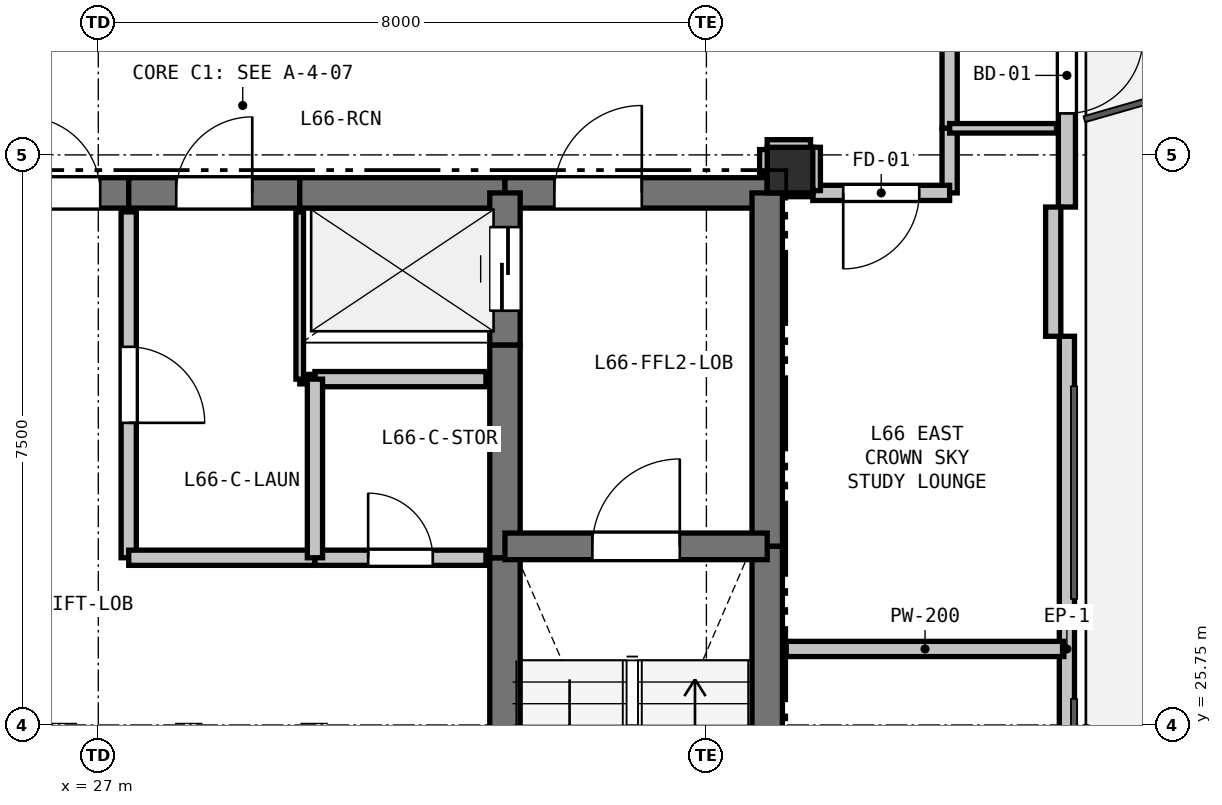
"""IFC4 building model, lengths in metres.
Left out: names, types, materials, properties, quantities, classifications, styles, units other than length and angle.
Written with IfcOpenShell. Run it as: python <this file> out.ifc"""

import sys

from ifc_helpers import new_model, si_unit, direction, frame, frame_2d, origin, origin_2d, place, context, subcontext, project, spatial, rectangle, extrude, element, fill, save


model = new_model("IFC4")
c1 = context("Model", 3, precision=1e-05, world=origin(), true_north=direction((0.0, 1.0)))
c2 = subcontext(c1, "Body", "Model", "MODEL_VIEW")
j1 = project(units=[si_unit("LENGTHUNIT", "METRE"), si_unit("PLANEANGLEUNIT", "RADIAN")], contexts=[c1])
p1 = place(None, origin())
s1 = spatial("IfcSite", under=j1, at=p1, CompositionType="ELEMENT")
p2 = place(p1, origin())
s2 = spatial("IfcBuilding", under=s1, at=p2, CompositionType="ELEMENT")
p3 = place(p2, frame((0.0, 0.0, 236.4)))
s3 = spatial("IfcBuildingStorey", under=s2, at=p3, CompositionType="ELEMENT", Elevation=236.4)
p4 = place(p3, frame((36.1, 33.05, 0.0), z_axis=(0.0, 0.0, 1.0), x_axis=(1.0, 0.0, 0.0)))
e1 = element("IfcColumn", 1, at=p4, inside=s3, PredefinedType="COLUMN", context=c2, shape_type="SweptSolid", body=[
    extrude(rectangle(XDim=0.6, YDim=0.6, at=origin_2d()), origin(), (0.0, 0.0, 1.0), 3.3),
])
p5 = place(p3, frame((20.066, 33.997, 0.0), z_axis=(0.0, 0.0, 1.0), x_axis=(0.866019557082, 0.500010126649, 0.0)))
e2 = element("IfcWall", 2, at=p5, inside=s3, PredefinedType="PARAPET", context=c2, shape_type="SweptSolid", body=[
    extrude(rectangle(XDim=8.228, YDim=0.2, at=frame_2d((4.114, 0.0))), origin(), (0.0, 0.0, 1.0), 0.2),
])
p6 = place(p3, frame((39.743, 41.492, 0.0), z_axis=(0.0, 0.0, 1.0), x_axis=(0.0, -1.0, 0.0)))
e3 = element("IfcWall", 3, at=p6, inside=s3, PredefinedType="SOLIDWALL", context=c2, shape_type="SweptSolid", body=[
    extrude(rectangle(XDim=8.928, YDim=0.225, at=frame_2d((4.464, 0.0))), origin(), (0.0, 0.0, 1.0), 2.7),
])
p7 = place(p6, frame((6.696, 0.0, 0.0)))
e4 = element("IfcOpeningElement", 4, at=p7, cuts=e3, PredefinedType="OPENING", context=c2, shape_type="SweptSolid", body=[
    extrude(rectangle(XDim=1.0, YDim=2.1, at=frame_2d((0.5, 1.05))), frame((0.0, 0.123, 0.0), z_axis=(0.0, -1.0, 0.0), x_axis=(1.0, 0.0, 0.0)), (0.0, 0.0, 1.0), 0.245),
])
p8 = place(p3, frame((39.743, 30.864, 0.0), z_axis=(0.0, 0.0, 1.0), x_axis=(0.0, -1.0, 0.0)))
e5 = element("IfcWall", 5, at=p8, inside=s3, PredefinedType="PARAPET", context=c2, shape_type="SweptSolid", body=[
    extrude(rectangle(XDim=8.228, YDim=0.2, at=frame_2d((4.114, 0.0))), origin(), (0.0, 0.0, 1.0), 0.2),
])
p9 = place(p3, frame((39.563, 32.564, 0.0), z_axis=(0.0, 0.0, 1.0), x_axis=(0.0, -1.0, 0.0)))
e6 = element("IfcWall", 6, at=p9, inside=s3, PredefinedType="PARAPET", context=c2, shape_type="SweptSolid", body=[
    extrude(rectangle(XDim=1.7, YDim=0.2, at=frame_2d((0.85, 0.0))), origin(), (0.0, 0.0, 1.0), 2.7),
])
p10 = place(p3, frame((25.65, 32.75, 0.0), z_axis=(0.0, 0.0, 1.0), x_axis=(1.0, 0.0, 0.0)))
e7 = element("IfcWall", 7, at=p10, inside=s3, PredefinedType="SHEAR", context=c2, shape_type="SweptSolid", body=[
    extrude(rectangle(XDim=1.75, YDim=0.4, at=frame_2d((0.875, 0.0))), origin(), (0.0, 0.0, 1.0), 3.08),
])
p11 = place(p10, frame((0.375, 0.0, 0.0)))
e8 = element("IfcOpeningElement", 8, at=p11, cuts=e7, PredefinedType="OPENING", context=c2, shape_type="SweptSolid", body=[
    extrude(rectangle(XDim=1.0, YDim=2.15, at=frame_2d((0.5, 1.075))), frame((0.0, 0.21, 0.0), z_axis=(0.0, -1.0, 0.0), x_axis=(1.0, 0.0, 0.0)), (0.0, 0.0, 1.0), 0.42),
])
p12 = place(p3, frame((27.4, 32.75, 0.0), z_axis=(0.0, 0.0, 1.0), x_axis=(1.0, 0.0, 0.0)))
e9 = element("IfcWall", 9, at=p12, inside=s3, PredefinedType="SHEAR", context=c2, shape_type="SweptSolid", body=[
    extrude(rectangle(XDim=2.25, YDim=0.4, at=frame_2d((1.125, 0.0))), origin(), (0.0, 0.0, 1.0), 3.08),
])
p13 = place(p12, frame((0.625, 0.0, 0.0)))
e10 = element("IfcOpeningElement", 10, at=p13, cuts=e9, PredefinedType="OPENING", context=c2, shape_type="SweptSolid", body=[
    extrude(rectangle(XDim=1.0, YDim=2.15, at=frame_2d((0.5, 1.075))), frame((0.0, 0.21, 0.0), z_axis=(0.0, -1.0, 0.0), x_axis=(1.0, 0.0, 0.0)), (0.0, 0.0, 1.0), 0.42),
])
p14 = place(p3, frame((29.65, 32.75, 0.0), z_axis=(0.0, 0.0, 1.0), x_axis=(1.0, 0.0, 0.0)))
e11 = element("IfcWall", 11, at=p14, inside=s3, PredefinedType="SHEAR", context=c2, shape_type="SweptSolid", body=[
    extrude(rectangle(XDim=2.7, YDim=0.4, at=frame_2d((1.35, 0.0))), origin(), (0.0, 0.0, 1.0), 3.08),
])
p15 = place(p3, frame((32.35, 32.75, 0.0), z_axis=(0.0, 0.0, 1.0), x_axis=(1.0, 0.0, 0.0)))
e12 = element("IfcWall", 12, at=p15, inside=s3, PredefinedType="SHEAR", context=c2, shape_type="SweptSolid", body=[
    extrude(rectangle(XDim=3.45, YDim=0.4, at=frame_2d((1.725, 0.0))), origin(), (0.0, 0.0, 1.0), 3.08),
])
p16 = place(p15, frame((0.65, 0.0, 0.0)))
e13 = element("IfcOpeningElement", 13, at=p16, cuts=e12, PredefinedType="OPENING", context=c2, shape_type="SweptSolid", body=[
    extrude(rectangle(XDim=1.15, YDim=2.15, at=frame_2d((0.575, 1.075))), frame((0.0, 0.21, 0.0), z_axis=(0.0, -1.0, 0.0), x_axis=(1.0, 0.0, 0.0)), (0.0, 0.0, 1.0), 0.42),
])
p17 = place(p3, frame((35.8, 32.75, 0.0), z_axis=(0.0, 0.0, 1.0), x_axis=(0.0, -1.0, 0.0)))
e14 = element("IfcWall", 14, at=p17, inside=s3, PredefinedType="SHEAR", context=c2, shape_type="SweptSolid", body=[
    extrude(rectangle(XDim=4.65, YDim=0.4, at=frame_2d((2.325, 0.0))), origin(), (0.0, 0.0, 1.0), 3.08),
])
p18 = place(p3, frame((35.8, 28.1, 0.0), z_axis=(0.0, 0.0, 1.0), x_axis=(0.0, -1.0, 0.0)))
e15 = element("IfcWall", 15, at=p18, inside=s3, PredefinedType="SHEAR", context=c2, shape_type="SweptSolid", body=[
    extrude(rectangle(XDim=7.35, YDim=0.4, at=frame_2d((3.675, 0.0))), origin(), (0.0, 0.0, 1.0), 3.08),
])
p19 = place(p3, frame((32.35, 25.55, 0.0), z_axis=(0.0, 0.0, 1.0), x_axis=(0.0, 1.0, 0.0)))
e16 = element("IfcWall", 16, at=p19, inside=s3, PredefinedType="SHEAR", context=c2, shape_type="SweptSolid", body=[
    extrude(rectangle(XDim=2.4, YDim=0.4, at=frame_2d((1.2, 0.0))), origin(), (0.0, 0.0, 1.0), 3.08),
])
p20 = place(p3, frame((32.35, 27.95, 0.0), z_axis=(0.0, 0.0, 1.0), x_axis=(0.0, 1.0, 0.0)))
e17 = element("IfcWall", 17, at=p20, inside=s3, PredefinedType="SHEAR", context=c2, shape_type="SweptSolid", body=[
    extrude(rectangle(XDim=2.8, YDim=0.4, at=frame_2d((1.4, 0.0))), origin(), (0.0, 0.0, 1.0), 3.08),
])
p21 = place(p3, frame((32.35, 30.75, 0.0), z_axis=(0.0, 0.0, 1.0), x_axis=(0.0, 1.0, 0.0)))
e18 = element("IfcWall", 18, at=p21, inside=s3, PredefinedType="SHEAR", context=c2, shape_type="SweptSolid", body=[
    extrude(rectangle(XDim=2.0, YDim=0.4, at=frame_2d((1.0, 0.0))), origin(), (0.0, 0.0, 1.0), 3.08),
])
p22 = place(p21, frame((0.45, 0.0, 0.0)))
e19 = element("IfcOpeningElement", 19, at=p22, cuts=e18, PredefinedType="OPENING", context=c2, shape_type="SweptSolid", body=[
    extrude(rectangle(XDim=1.1, YDim=2.15, at=frame_2d((0.55, 1.075))), frame((0.0, 0.21, 0.0), z_axis=(0.0, -1.0, 0.0), x_axis=(1.0, 0.0, 0.0)), (0.0, 0.0, 1.0), 0.42),
])
p23 = place(p3, frame((32.35, 28.1, 0.0), z_axis=(0.0, 0.0, 1.0), x_axis=(1.0, 0.0, 0.0)))
e20 = element("IfcWall", 20, at=p23, inside=s3, PredefinedType="SHEAR", context=c2, shape_type="SweptSolid", body=[
    extrude(rectangle(XDim=3.45, YDim=0.35, at=frame_2d((1.725, 0.0))), origin(), (0.0, 0.0, 1.0), 3.08),
])
p24 = place(p23, frame((1.15, 0.0, 0.0)))
e21 = element("IfcOpeningElement", 21, at=p24, cuts=e20, PredefinedType="OPENING", context=c2, shape_type="SweptSolid", body=[
    extrude(rectangle(XDim=1.15, YDim=2.15, at=frame_2d((0.575, 1.075))), frame((0.0, 0.185, 0.0), z_axis=(0.0, -1.0, 0.0), x_axis=(1.0, 0.0, 0.0)), (0.0, 0.0, 1.0), 0.37),
])
p25 = place(p3, frame((32.1, 30.3, 0.0), z_axis=(0.0, 0.0, 1.0), x_axis=(-1.0, 0.0, 0.0)))
e22 = element("IfcWall", 22, at=p25, inside=s3, PredefinedType="PARTITIONING", context=c2, shape_type="SweptSolid", body=[
    extrude(rectangle(XDim=2.25, YDim=0.2, at=frame_2d((1.125, 0.0))), origin(), (0.0, 0.0, 1.0), 3.08),
])
p26 = place(p3, frame((29.85, 30.3, 0.0), z_axis=(0.0, 0.0, 1.0), x_axis=(-1.0, 0.0, 0.0)))
e23 = element("IfcWall", 23, at=p26, inside=s3, PredefinedType="PARTITIONING", context=c2, shape_type="SweptSolid", body=[
    extrude(rectangle(XDim=0.2, YDim=0.125, at=frame_2d((0.1, 0.0))), origin(), (0.0, 0.0, 1.0), 3.08),
])
p27 = place(p3, frame((29.65, 30.3, 0.0), z_axis=(0.0, 0.0, 1.0), x_axis=(0.0, 1.0, 0.0)))
e24 = element("IfcWall", 24, at=p27, inside=s3, PredefinedType="PARTITIONING", context=c2, shape_type="SweptSolid", body=[
    extrude(rectangle(XDim=2.2, YDim=0.1, at=frame_2d((1.1, 0.0))), origin(), (0.0, 0.0, 1.0), 3.08),
])
p28 = place(p3, frame((27.4, 32.5, 0.0), z_axis=(0.0, 0.0, 1.0), x_axis=(0.0, -1.0, 0.0)))
e25 = element("IfcWall", 25, at=p28, inside=s3, PredefinedType="PARTITIONING", context=c2, shape_type="SweptSolid", body=[
    extrude(rectangle(XDim=4.55, YDim=0.2, at=frame_2d((2.275, 0.0))), origin(), (0.0, 0.0, 1.0), 3.08),
])
p29 = place(p28, frame((1.775, 0.0, 0.0)))
e26 = element("IfcOpeningElement", 26, at=p29, cuts=e25, PredefinedType="OPENING", context=c2, shape_type="SweptSolid", body=[
    extrude(rectangle(XDim=1.0, YDim=2.15, at=frame_2d((0.5, 1.075))), frame((0.0, 0.11, 0.0), z_axis=(0.0, -1.0, 0.0), x_axis=(1.0, 0.0, 0.0)), (0.0, 0.0, 1.0), 0.22),
])
p30 = place(p3, frame((27.4, 27.95, 0.0), z_axis=(0.0, 0.0, 1.0), x_axis=(1.0, 0.0, 0.0)))
e27 = element("IfcWall", 27, at=p30, inside=s3, PredefinedType="PARTITIONING", context=c2, shape_type="SweptSolid", body=[
    extrude(rectangle(XDim=2.45, YDim=0.2, at=frame_2d((1.225, 0.0))), origin(), (0.0, 0.0, 1.0), 3.08),
])
p31 = place(p3, frame((29.85, 27.95, 0.0), z_axis=(0.0, 0.0, 1.0), x_axis=(1.0, 0.0, 0.0)))
e28 = element("IfcWall", 28, at=p31, inside=s3, PredefinedType="PARTITIONING", context=c2, shape_type="SweptSolid", body=[
    extrude(rectangle(XDim=2.25, YDim=0.2, at=frame_2d((1.125, 0.0))), origin(), (0.0, 0.0, 1.0), 3.08),
])
p32 = place(p31, frame((0.7, 0.0, 0.0)))
e29 = element("IfcOpeningElement", 29, at=p32, cuts=e28, PredefinedType="OPENING", context=c2, shape_type="SweptSolid", body=[
    extrude(rectangle(XDim=0.85, YDim=2.1, at=frame_2d((0.425, 1.05))), frame((0.0, 0.11, 0.0), z_axis=(0.0, -1.0, 0.0), x_axis=(1.0, 0.0, 0.0)), (0.0, 0.0, 1.0), 0.22),
])
p33 = place(p3, frame((38.2, 35.2, 0.0), z_axis=(0.0, 0.0, 1.0), x_axis=(0.0, -1.0, 0.0)))
e30 = element("IfcWall", 30, at=p33, inside=s3, PredefinedType="PARTITIONING", context=c2, shape_type="SweptSolid", body=[
    extrude(rectangle(XDim=1.6, YDim=0.2, at=frame_2d((0.8, 0.0))), origin(), (0.0, 0.0, 1.0), 3.08),
])
p34 = place(p3, frame((38.2, 33.6, 0.0), z_axis=(0.0, 0.0, 1.0), x_axis=(0.0, -1.0, 0.0)))
e31 = element("IfcWall", 31, at=p34, inside=s3, PredefinedType="PARTITIONING", context=c2, shape_type="SweptSolid", body=[
    extrude(rectangle(XDim=0.85, YDim=0.2, at=frame_2d((0.425, 0.0))), origin(), (0.0, 0.0, 1.0), 3.08),
])
p35 = place(p3, frame((38.2, 32.75, 0.0), z_axis=(0.0, 0.0, 1.0), x_axis=(-1.0, 0.0, 0.0)))
e32 = element("IfcWall", 32, at=p35, inside=s3, PredefinedType="PARTITIONING", context=c2, shape_type="SweptSolid", body=[
    extrude(rectangle(XDim=1.8, YDim=0.2, at=frame_2d((0.9, 0.0))), origin(), (0.0, 0.0, 1.0), 3.08),
])
p36 = place(p35, frame((0.4, 0.0, 0.0)))
e33 = element("IfcOpeningElement", 33, at=p36, cuts=e32, PredefinedType="OPENING", context=c2, shape_type="SweptSolid", body=[
    extrude(rectangle(XDim=1.0, YDim=2.15, at=frame_2d((0.5, 1.075))), frame((0.0, 0.11, 0.0), z_axis=(0.0, -1.0, 0.0), x_axis=(1.0, 0.0, 0.0)), (0.0, 0.0, 1.0), 0.22),
])
for number, where, z_axis, x_axis in (
    (34, (36.4, 32.78, 0.0), (0.0, 0.0, 1.0), (0.0, 1.0, 0.0)),
    (35, (36.37, 33.35, 0.0), (0.0, 0.0, 1.0), (-1.0, 0.0, 0.0)),
):
    element("IfcWall", number, at=place(p3, frame(where, z_axis=z_axis, x_axis=x_axis)), inside=s3, PredefinedType="PARTITIONING", context=c2, shape_type="SweptSolid", body=[
        extrude(rectangle(XDim=0.57, YDim=0.2, at=frame_2d((0.285, 0.0))), origin(), (0.0, 0.0, 1.0), 2.528),
    ])
p37 = place(p3, frame((35.8, 33.32, 0.0), z_axis=(0.0, 0.0, 1.0), x_axis=(0.0, -1.0, 0.0)))
e36 = element("IfcWall", 36, at=p37, inside=s3, PredefinedType="PARTITIONING", context=c2, shape_type="SweptSolid", body=[
    extrude(rectangle(XDim=0.32, YDim=0.2, at=frame_2d((0.16, 0.0))), origin(), (0.0, 0.0, 1.0), 2.605),
])
p38 = place(p3, frame((29.85, 30.3, 0.0), z_axis=(0.0, 0.0, 1.0), x_axis=(0.0, -1.0, 0.0)))
e37 = element("IfcWall", 37, at=p38, inside=s3, PredefinedType="PARTITIONING", context=c2, shape_type="SweptSolid", body=[
    extrude(rectangle(XDim=2.35, YDim=0.2, at=frame_2d((1.175, 0.0))), origin(), (0.0, 0.0, 1.0), 3.08),
])
p39 = place(p3, frame((36.05, 32.75, 0.0), z_axis=(0.0, 0.0, 1.0), x_axis=(1.0, 0.0, 0.0)))
e38 = element("IfcWall", 38, at=p39, inside=s3, PredefinedType="PARTITIONING", context=c2, shape_type="SweptSolid", body=[
    extrude(rectangle(XDim=0.35, YDim=0.1, at=frame_2d((0.175, 0.0))), origin(), (0.0, 0.0, 1.0), 2.605),
])
p40 = place(p3, frame((38.2, 33.6, 0.0), z_axis=(0.0, 0.0, 1.0), x_axis=(1.0, 0.0, 0.0)))
e39 = element("IfcWall", 39, at=p40, inside=s3, PredefinedType="PARTITIONING", context=c2, shape_type="SweptSolid", body=[
    extrude(rectangle(XDim=1.406, YDim=0.125, at=frame_2d((0.703, 0.0))), origin(), (0.0, 0.0, 1.0), 2.365),
])
p41 = place(p3, frame((39.703, 26.75, 0.0), z_axis=(0.0, 0.0, 1.0), x_axis=(-1.0, 0.0, 0.0)))
e40 = element("IfcWall", 40, at=p41, inside=s3, PredefinedType="PARTITIONING", context=c2, shape_type="SweptSolid", body=[
    extrude(rectangle(XDim=3.653, YDim=0.2, at=frame_2d((1.826, 0.0))), origin(), (0.0, 0.0, 1.0), 2.365),
])
p42 = place(p7, origin())
e41 = element("IfcDoor", 41, at=p42, inside=s3, OperationType="SINGLE_SWING_LEFT", PredefinedType="DOOR", context=c2, shape_type="SweptSolid", body=[
    extrude(rectangle(XDim=1.0, YDim=2.1, at=frame_2d((0.5, 1.05))), frame((0.0, 0.025, 0.0), z_axis=(0.0, -1.0, 0.0), x_axis=(1.0, 0.0, 0.0)), (0.0, 0.0, 1.0), 0.05),
])
fill(e4, e41)
p43 = place(p11, origin())
e42 = element("IfcDoor", 42, at=p43, inside=s3, OperationType="SINGLE_SWING_LEFT", PredefinedType="DOOR", context=c2, shape_type="SweptSolid", body=[
    extrude(rectangle(XDim=1.0, YDim=2.15, at=frame_2d((0.5, 1.075))), frame((0.0, 0.025, 0.0), z_axis=(0.0, -1.0, 0.0), x_axis=(1.0, 0.0, 0.0)), (0.0, 0.0, 1.0), 0.05),
])
fill(e8, e42)
p44 = place(p22, origin())
e43 = element("IfcDoor", 43, at=p44, inside=s3, OperationType="SLIDING_TO_LEFT", PredefinedType="DOOR", context=c2, shape_type="SweptSolid", body=[
    extrude(rectangle(XDim=1.1, YDim=2.15, at=frame_2d((0.55, 1.075))), frame((0.0, 0.025, 0.0), z_axis=(0.0, -1.0, 0.0), x_axis=(1.0, 0.0, 0.0)), (0.0, 0.0, 1.0), 0.05),
])
fill(e19, e43)
p45 = place(p24, origin())
e44 = element("IfcDoor", 44, at=p45, inside=s3, OperationType="SINGLE_SWING_RIGHT", PredefinedType="DOOR", context=c2, shape_type="SweptSolid", body=[
    extrude(rectangle(XDim=1.15, YDim=2.15, at=frame_2d((0.575, 1.075))), frame((0.0, 0.025, 0.0), z_axis=(0.0, -1.0, 0.0), x_axis=(1.0, 0.0, 0.0)), (0.0, 0.0, 1.0), 0.05),
])
fill(e21, e44)
p46 = place(p16, origin())
e45 = element("IfcDoor", 45, at=p46, inside=s3, OperationType="SINGLE_SWING_RIGHT", PredefinedType="DOOR", context=c2, shape_type="SweptSolid", body=[
    extrude(rectangle(XDim=1.15, YDim=2.15, at=frame_2d((0.575, 1.075))), frame((0.0, 0.025, 0.0), z_axis=(0.0, -1.0, 0.0), x_axis=(1.0, 0.0, 0.0)), (0.0, 0.0, 1.0), 0.05),
])
fill(e13, e45)
p47 = place(p29, origin())
e46 = element("IfcDoor", 46, at=p47, inside=s3, OperationType="SINGLE_SWING_RIGHT", PredefinedType="DOOR", context=c2, shape_type="SweptSolid", body=[
    extrude(rectangle(XDim=1.0, YDim=2.15, at=frame_2d((0.5, 1.075))), frame((0.0, 0.025, 0.0), z_axis=(0.0, -1.0, 0.0), x_axis=(1.0, 0.0, 0.0)), (0.0, 0.0, 1.0), 0.05),
])
fill(e26, e46)
p48 = place(p32, origin())
e47 = element("IfcDoor", 47, at=p48, inside=s3, OperationType="SINGLE_SWING_LEFT", PredefinedType="DOOR", context=c2, shape_type="SweptSolid", body=[
    extrude(rectangle(XDim=0.85, YDim=2.1, at=frame_2d((0.425, 1.05))), frame((0.0, 0.025, 0.0), z_axis=(0.0, -1.0, 0.0), x_axis=(1.0, 0.0, 0.0)), (0.0, 0.0, 1.0), 0.05),
])
fill(e29, e47)
p49 = place(p13, origin())
e48 = element("IfcDoor", 48, at=p49, inside=s3, OperationType="SINGLE_SWING_RIGHT", PredefinedType="DOOR", context=c2, shape_type="SweptSolid", body=[
    extrude(rectangle(XDim=1.0, YDim=2.15, at=frame_2d((0.5, 1.075))), frame((0.0, 0.025, 0.0), z_axis=(0.0, -1.0, 0.0), x_axis=(1.0, 0.0, 0.0)), (0.0, 0.0, 1.0), 0.05),
])
fill(e10, e48)
p50 = place(p36, origin())
e49 = element("IfcDoor", 49, at=p50, inside=s3, OperationType="SINGLE_SWING_RIGHT", PredefinedType="DOOR", context=c2, shape_type="SweptSolid", body=[
    extrude(rectangle(XDim=1.0, YDim=2.15, at=frame_2d((0.5, 1.075))), frame((0.0, 0.025, 0.0), z_axis=(0.0, -1.0, 0.0), x_axis=(1.0, 0.0, 0.0)), (0.0, 0.0, 1.0), 0.05),
])
fill(e33, e49)
save(model, sys.argv[1])
